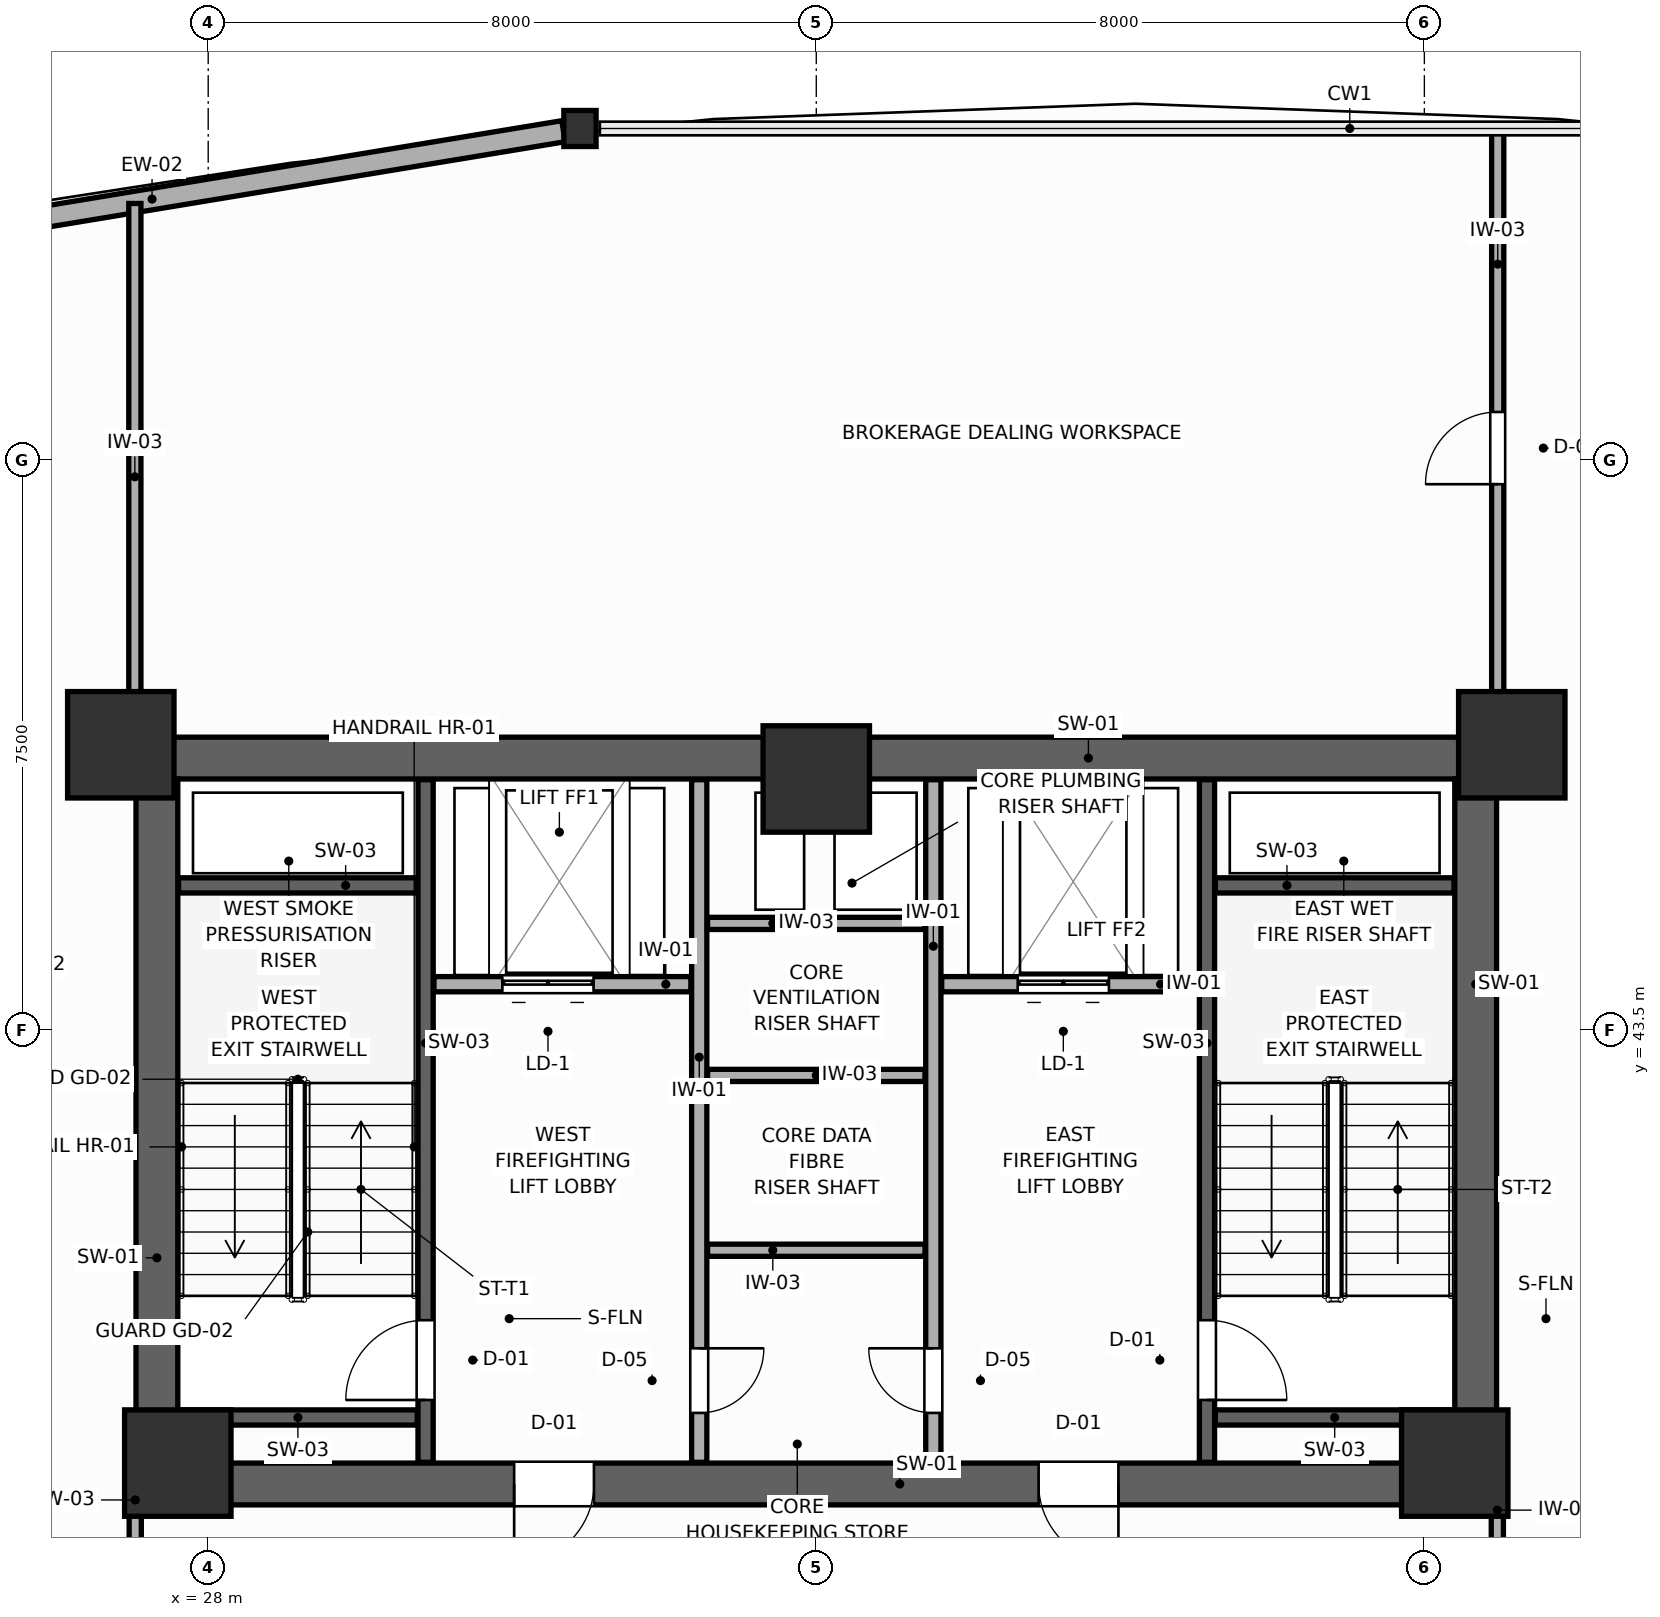
"""IFC4 building model, lengths in metres.
Left out: names, types, materials, properties, quantities, classifications, styles, units other than length and angle.
Written with IfcOpenShell. Run it as: python <this file> out.ifc"""

import sys

from ifc_helpers import new_model, si_unit, direction, frame, frame_2d, origin, origin_2d, place, context, subcontext, project, spatial, rectangle, i_section, extrude, source, transform, mapped, element, fill, save


model = new_model("IFC4")
c1 = context("Model", 3, precision=1e-05, world=origin(), true_north=direction((0.0, 1.0)))
c2 = subcontext(c1, "Body", "Model", "MODEL_VIEW")
j1 = project(units=[si_unit("LENGTHUNIT", "METRE"), si_unit("PLANEANGLEUNIT", "RADIAN")], contexts=[c1])
p1 = place(None, origin())
s1 = spatial("IfcSite", under=j1, at=p1, CompositionType="ELEMENT")
p2 = place(p1, origin())
s2 = spatial("IfcBuilding", under=s1, at=p2, CompositionType="ELEMENT")
p3 = place(p2, frame((0.0, 0.0, 87.3)))
s3 = spatial("IfcBuildingStorey", under=s2, at=p3, CompositionType="ELEMENT", Elevation=87.3)
p4 = place(p3, frame((27.05, 47.075, 0.0), z_axis=(0.0, 0.0, 1.0), x_axis=(1.0, 0.0, 0.0)))
e1 = element("IfcWall", 1, at=p4, inside=s3, PredefinedType="SHEAR", context=c2, shape_type="SweptSolid", body=[
    extrude(rectangle(XDim=17.9, YDim=0.55, at=frame_2d((8.95, 0.0))), origin(), (0.0, 0.0, 1.0), 3.9),
])
p5 = place(p3, frame((27.05, 37.525, 0.0), z_axis=(0.0, 0.0, 1.0), x_axis=(1.0, 0.0, 0.0)))
e2 = element("IfcWall", 2, at=p5, inside=s3, PredefinedType="SHEAR", context=c2, shape_type="SweptSolid", body=[
    extrude(rectangle(XDim=17.9, YDim=0.55, at=frame_2d((8.95, 0.0))), origin(), (0.0, 0.0, 1.0), 3.9),
])
p6 = place(p5, frame((4.975, 0.0, 0.0)))
e3 = element("IfcOpeningElement", 3, at=p6, cuts=e2, PredefinedType="OPENING", context=c2, shape_type="SweptSolid", body=[
    extrude(rectangle(XDim=1.05, YDim=2.1, at=frame_2d((0.525, 1.05))), frame((0.0, 0.285, 0.0), z_axis=(0.0, -1.0, 0.0), x_axis=(1.0, 0.0, 0.0)), (0.0, 0.0, 1.0), 0.57),
])
p7 = place(p5, frame((11.875, 0.0, 0.0)))
e4 = element("IfcOpeningElement", 4, at=p7, cuts=e2, PredefinedType="OPENING", context=c2, shape_type="SweptSolid", body=[
    extrude(rectangle(XDim=1.05, YDim=2.1, at=frame_2d((0.525, 1.05))), frame((0.0, 0.285, 0.0), z_axis=(0.0, -1.0, 0.0), x_axis=(1.0, 0.0, 0.0)), (0.0, 0.0, 1.0), 0.57),
])
for number, where, z_axis, x_axis in (
    (5, (27.325, 37.8, 0.0), (0.0, 0.0, 1.0), (0.0, 1.0, 0.0)),
    (6, (44.675, 37.8, 0.0), (0.0, 0.0, 1.0), (0.0, 1.0, 0.0)),
):
    element("IfcWall", number, at=place(p3, frame(where, z_axis=z_axis, x_axis=x_axis)), inside=s3, PredefinedType="SHEAR", context=c2, shape_type="SweptSolid", body=[
        extrude(rectangle(XDim=9.0, YDim=0.55, at=frame_2d((4.5, 0.0))), origin(), (0.0, 0.0, 1.0), 3.9),
    ])
m1 = source(origin(), c2, "Body", "SweptSolid", [
    extrude(rectangle(XDim=1.4, YDim=1.4, at=origin_2d()), origin(), (0.0, 0.0, 1.0), 3.9),
])
for number, where, z_axis, x_axis in (
    (7, (26.85, 47.25, 0.0), (0.0, 0.0, 1.0), (1.0, 0.0, 0.0)),
    (8, (45.15, 47.25, 0.0), (0.0, 0.0, 1.0), (1.0, 0.0, 0.0)),
    (9, (27.6, 37.8, 0.0), (0.0, 0.0, 1.0), (1.0, 0.0, 0.0)),
    (10, (44.4, 37.8, 0.0), (0.0, 0.0, 1.0), (1.0, 0.0, 0.0)),
    (11, (36.0, 46.8, 0.0), (0.0, 0.0, 1.0), (1.0, 0.0, 0.0)),
):
    element("IfcColumn", number, at=place(p3, frame(where, z_axis=z_axis, x_axis=x_axis)), inside=s3, PredefinedType="COLUMN", context=c2, shape_type="MappedRepresentation", body=[
        mapped(m1, transform((0.0, 0.0, 0.0), scale=1.0)),
    ])
m2 = source(origin(), c2, "Body", "SweptSolid", [
    extrude(i_section(OverallWidth=0.424, OverallDepth=0.474, WebThickness=0.045, FlangeThickness=0.072, FilletRadius=0.015, at=origin_2d()), origin(), (0.0, 0.0, 1.0), 3.9),
])
p8 = place(p3, frame((32.891, 55.358, 0.0), z_axis=(0.0, 0.0, 1.0), x_axis=(1.0, 0.0, 0.0)))
e12 = element("IfcColumn", 12, at=p8, inside=s3, PredefinedType="COLUMN", context=c2, shape_type="MappedRepresentation", body=[
    mapped(m2, transform((0.0, 0.0, 0.0), scale=1.0)),
])
p9 = place(p3, frame((32.674, 55.322, 0.0), z_axis=(0.0, 0.0, 1.0), x_axis=(-0.986649424809, -0.162858566012, 0.0)))
e13 = element("IfcWall", 13, at=p9, inside=s3, PredefinedType="SOLIDWALL", context=c2, shape_type="SweptSolid", body=[
    extrude(rectangle(XDim=16.836, YDim=0.28, at=frame_2d((8.418, 0.0))), origin(), (0.0, 0.0, 1.0), 3.23),
])
p10 = place(p9, frame((11.152, 0.0, 0.75)))
e14 = element("IfcOpeningElement", 14, at=p10, cuts=e13, PredefinedType="OPENING", context=c2, shape_type="SweptSolid", body=[
    extrude(rectangle(XDim=1.7, YDim=1.75, at=frame_2d((0.85, 0.875))), frame((0.0, 0.15, 0.0), z_axis=(0.0, -1.0, 0.0), x_axis=(1.0, 0.0, 0.0)), (0.0, 0.0, 1.0), 0.3),
])
p11 = place(p3, frame((30.86, 37.81, 0.0), z_axis=(0.0, 0.0, 1.0), x_axis=(0.0, 1.0, 0.0)))
e15 = element("IfcWall", 15, at=p11, inside=s3, PredefinedType="SHEAR", context=c2, shape_type="SweptSolid", body=[
    extrude(rectangle(XDim=8.98, YDim=0.2, at=frame_2d((4.49, 0.0))), origin(), (0.0, 0.0, 1.0), 3.9),
])
p12 = place(p11, frame((0.82, 0.0, 0.0)))
e16 = element("IfcOpeningElement", 16, at=p12, cuts=e15, PredefinedType="OPENING", context=c2, shape_type="SweptSolid", body=[
    extrude(rectangle(XDim=1.05, YDim=2.1, at=frame_2d((0.525, 1.05))), frame((0.0, 0.11, 0.0), z_axis=(0.0, -1.0, 0.0), x_axis=(1.0, 0.0, 0.0)), (0.0, 0.0, 1.0), 0.22),
])
for number, where, z_axis, x_axis in (
    (17, (27.61, 45.4, 0.0), (0.0, 0.0, 1.0), (1.0, 0.0, 0.0)),
    (18, (27.61, 38.4, 0.0), (0.0, 0.0, 1.0), (1.0, 0.0, 0.0)),
):
    element("IfcWall", number, at=place(p3, frame(where, z_axis=z_axis, x_axis=x_axis)), inside=s3, PredefinedType="SHEAR", context=c2, shape_type="SweptSolid", body=[
        extrude(rectangle(XDim=3.14, YDim=0.2, at=frame_2d((1.57, 0.0))), origin(), (0.0, 0.0, 1.0), 3.9),
    ])
p13 = place(p3, frame((41.14, 37.81, 0.0), z_axis=(0.0, 0.0, 1.0), x_axis=(0.0, 1.0, 0.0)))
e19 = element("IfcWall", 19, at=p13, inside=s3, PredefinedType="SHEAR", context=c2, shape_type="SweptSolid", body=[
    extrude(rectangle(XDim=8.98, YDim=0.2, at=frame_2d((4.49, 0.0))), origin(), (0.0, 0.0, 1.0), 3.9),
])
p14 = place(p13, frame((0.82, 0.0, 0.0)))
e20 = element("IfcOpeningElement", 20, at=p14, cuts=e19, PredefinedType="OPENING", context=c2, shape_type="SweptSolid", body=[
    extrude(rectangle(XDim=1.05, YDim=2.1, at=frame_2d((0.525, 1.05))), frame((0.0, 0.11, 0.0), z_axis=(0.0, -1.0, 0.0), x_axis=(1.0, 0.0, 0.0)), (0.0, 0.0, 1.0), 0.22),
])
for number, where, z_axis, x_axis in (
    (21, (41.25, 45.4, 0.0), (0.0, 0.0, 1.0), (1.0, 0.0, 0.0)),
    (22, (41.25, 38.4, 0.0), (0.0, 0.0, 1.0), (1.0, 0.0, 0.0)),
):
    element("IfcWall", number, at=place(p3, frame(where, z_axis=z_axis, x_axis=x_axis)), inside=s3, PredefinedType="SHEAR", context=c2, shape_type="SweptSolid", body=[
        extrude(rectangle(XDim=3.14, YDim=0.2, at=frame_2d((1.57, 0.0))), origin(), (0.0, 0.0, 1.0), 3.9),
    ])
p15 = place(p3, frame((30.97, 44.1, 0.0), z_axis=(0.0, 0.0, 1.0), x_axis=(1.0, 0.0, 0.0)))
e23 = element("IfcWall", 23, at=p15, inside=s3, PredefinedType="PARTITIONING", context=c2, shape_type="SweptSolid", body=[
    extrude(rectangle(XDim=3.38, YDim=0.2, at=frame_2d((1.69, 0.0))), origin(), (0.0, 0.0, 1.0), 3.68),
])
p16 = place(p15, frame((0.9, 0.0, 0.0)))
e24 = element("IfcOpeningElement", 24, at=p16, cuts=e23, PredefinedType="OPENING", context=c2, shape_type="SweptSolid", body=[
    extrude(rectangle(XDim=1.2, YDim=2.1, at=frame_2d((0.6, 1.05))), frame((0.0, 0.11, 0.0), z_axis=(0.0, -1.0, 0.0), x_axis=(1.0, 0.0, 0.0)), (0.0, 0.0, 1.0), 0.22),
])
p17 = place(p3, frame((37.65, 44.1, 0.0), z_axis=(0.0, 0.0, 1.0), x_axis=(1.0, 0.0, 0.0)))
e25 = element("IfcWall", 25, at=p17, inside=s3, PredefinedType="PARTITIONING", context=c2, shape_type="SweptSolid", body=[
    extrude(rectangle(XDim=3.38, YDim=0.2, at=frame_2d((1.69, 0.0))), origin(), (0.0, 0.0, 1.0), 3.68),
])
p18 = place(p17, frame((1.0, 0.0, 0.0)))
e26 = element("IfcOpeningElement", 26, at=p18, cuts=e25, PredefinedType="OPENING", context=c2, shape_type="SweptSolid", body=[
    extrude(rectangle(XDim=1.2, YDim=2.1, at=frame_2d((0.6, 1.05))), frame((0.0, 0.11, 0.0), z_axis=(0.0, -1.0, 0.0), x_axis=(1.0, 0.0, 0.0)), (0.0, 0.0, 1.0), 0.22),
])
p19 = place(p3, frame((34.46, 37.81, 0.0), z_axis=(0.0, 0.0, 1.0), x_axis=(0.0, 1.0, 0.0)))
e27 = element("IfcWall", 27, at=p19, inside=s3, PredefinedType="PARTITIONING", context=c2, shape_type="SweptSolid", body=[
    extrude(rectangle(XDim=8.98, YDim=0.2, at=frame_2d((4.49, 0.0))), origin(), (0.0, 0.0, 1.0), 3.68),
])
p20 = place(p19, frame((0.65, 0.0, 0.0)))
e28 = element("IfcOpeningElement", 28, at=p20, cuts=e27, PredefinedType="OPENING", context=c2, shape_type="SweptSolid", body=[
    extrude(rectangle(XDim=0.85, YDim=2.05, at=frame_2d((0.425, 1.025))), frame((0.0, 0.11, 0.0), z_axis=(0.0, -1.0, 0.0), x_axis=(1.0, 0.0, 0.0)), (0.0, 0.0, 1.0), 0.22),
])
p21 = place(p3, frame((37.54, 37.81, 0.0), z_axis=(0.0, 0.0, 1.0), x_axis=(0.0, 1.0, 0.0)))
e29 = element("IfcWall", 29, at=p21, inside=s3, PredefinedType="PARTITIONING", context=c2, shape_type="SweptSolid", body=[
    extrude(rectangle(XDim=8.98, YDim=0.2, at=frame_2d((4.49, 0.0))), origin(), (0.0, 0.0, 1.0), 3.68),
])
p22 = place(p21, frame((0.65, 0.0, 0.0)))
e30 = element("IfcOpeningElement", 30, at=p22, cuts=e29, PredefinedType="OPENING", context=c2, shape_type="SweptSolid", body=[
    extrude(rectangle(XDim=0.85, YDim=2.05, at=frame_2d((0.425, 1.025))), frame((0.0, 0.11, 0.0), z_axis=(0.0, -1.0, 0.0), x_axis=(1.0, 0.0, 0.0)), (0.0, 0.0, 1.0), 0.22),
])
for number, where, z_axis, x_axis in (
    (31, (34.57, 40.6, 0.0), (0.0, 0.0, 1.0), (1.0, 0.0, 0.0)),
    (32, (34.57, 42.9, 0.0), (0.0, 0.0, 1.0), (1.0, 0.0, 0.0)),
    (33, (34.57, 44.9, 0.0), (0.0, 0.0, 1.0), (1.0, 0.0, 0.0)),
):
    element("IfcWall", number, at=place(p3, frame(where, z_axis=z_axis, x_axis=x_axis)), inside=s3, PredefinedType="PARTITIONING", context=c2, shape_type="SweptSolid", body=[
        extrude(rectangle(XDim=2.86, YDim=0.16, at=frame_2d((1.43, 0.0))), origin(), (0.0, 0.0, 1.0), 3.68),
    ])
p23 = place(p3, frame((27.04, 35.0, 0.0), z_axis=(0.0, 0.0, 1.0), x_axis=(0.0, 1.0, 0.0)))
e34 = element("IfcWall", 34, at=p23, inside=s3, PredefinedType="PARTITIONING", context=c2, shape_type="SweptSolid", body=[
    extrude(rectangle(XDim=2.65, YDim=0.16, at=frame_2d((1.325, 0.0))), origin(), (0.0, 0.0, 1.0), 3.68),
])
p24 = place(p23, frame((0.75, 0.0, 0.0)))
e35 = element("IfcOpeningElement", 35, at=p24, cuts=e34, PredefinedType="OPENING", context=c2, shape_type="SweptSolid", body=[
    extrude(rectangle(XDim=1.05, YDim=2.1, at=frame_2d((0.525, 1.05))), frame((0.0, 0.09, 0.0), z_axis=(0.0, -1.0, 0.0), x_axis=(1.0, 0.0, 0.0)), (0.0, 0.0, 1.0), 0.18),
])
p25 = place(p3, frame((44.96, 35.0, 0.0), z_axis=(0.0, 0.0, 1.0), x_axis=(0.0, 1.0, 0.0)))
e36 = element("IfcWall", 36, at=p25, inside=s3, PredefinedType="PARTITIONING", context=c2, shape_type="SweptSolid", body=[
    extrude(rectangle(XDim=2.65, YDim=0.16, at=frame_2d((1.325, 0.0))), origin(), (0.0, 0.0, 1.0), 3.68),
])
p26 = place(p25, frame((0.75, 0.0, 0.0)))
e37 = element("IfcOpeningElement", 37, at=p26, cuts=e36, PredefinedType="OPENING", context=c2, shape_type="SweptSolid", body=[
    extrude(rectangle(XDim=1.05, YDim=2.1, at=frame_2d((0.525, 1.05))), frame((0.0, 0.09, 0.0), z_axis=(0.0, -1.0, 0.0), x_axis=(1.0, 0.0, 0.0)), (0.0, 0.0, 1.0), 0.18),
])
p27 = place(p3, frame((44.965, 47.18, 0.0), z_axis=(0.0, 0.0, 1.0), x_axis=(0.0, 1.0, 0.0)))
e38 = element("IfcWall", 38, at=p27, inside=s3, PredefinedType="PARTITIONING", context=c2, shape_type="SweptSolid", body=[
    extrude(rectangle(XDim=8.158, YDim=0.16, at=frame_2d((4.079, 0.0))), origin(), (0.0, 0.0, 1.0), 3.68),
])
p28 = place(p27, frame((3.498, 0.0, 0.0)))
e39 = element("IfcOpeningElement", 39, at=p28, cuts=e38, PredefinedType="OPENING", context=c2, shape_type="SweptSolid", body=[
    extrude(rectangle(XDim=0.95, YDim=2.05, at=frame_2d((0.475, 1.025))), frame((0.0, 0.09, 0.0), z_axis=(0.0, -1.0, 0.0), x_axis=(1.0, 0.0, 0.0)), (0.0, 0.0, 1.0), 0.18),
])
p29 = place(p3, frame((27.035, 47.18, 0.0), z_axis=(0.0, 0.0, 1.0), x_axis=(0.0, 1.0, 0.0)))
e40 = element("IfcWall", 40, at=p29, inside=s3, PredefinedType="PARTITIONING", context=c2, shape_type="SweptSolid", body=[
    extrude(rectangle(XDim=7.191, YDim=0.16, at=frame_2d((3.596, 0.0))), origin(), (0.0, 0.0, 1.0), 3.68),
])
p30 = place(p12, origin())
e41 = element("IfcDoor", 41, at=p30, inside=s3, OperationType="SINGLE_SWING_LEFT", PredefinedType="DOOR", context=c2, shape_type="SweptSolid", body=[
    extrude(rectangle(XDim=1.05, YDim=2.1, at=frame_2d((0.525, 1.05))), frame((0.0, 0.025, 0.0), z_axis=(0.0, -1.0, 0.0), x_axis=(1.0, 0.0, 0.0)), (0.0, 0.0, 1.0), 0.05),
])
fill(e16, e41)
p31 = place(p14, frame((1.05, 0.0, 0.0), z_axis=(0.0, 0.0, 1.0), x_axis=(-1.0, 0.0, 0.0)))
e42 = element("IfcDoor", 42, at=p31, inside=s3, OperationType="SINGLE_SWING_RIGHT", PredefinedType="DOOR", context=c2, shape_type="SweptSolid", body=[
    extrude(rectangle(XDim=1.05, YDim=2.1, at=frame_2d((0.525, 1.05))), frame((0.0, 0.025, 0.0), z_axis=(0.0, -1.0, 0.0), x_axis=(1.0, 0.0, 0.0)), (0.0, 0.0, 1.0), 0.05),
])
fill(e20, e42)
p32 = place(p16, origin())
e43 = element("IfcDoor", 43, at=p32, inside=s3, OperationType="DOUBLE_DOOR_SLIDING", PredefinedType="DOOR", context=c2, shape_type="SweptSolid", body=[
    extrude(rectangle(XDim=1.2, YDim=2.1, at=frame_2d((0.6, 1.05))), frame((0.0, 0.025, 0.0), z_axis=(0.0, -1.0, 0.0), x_axis=(1.0, 0.0, 0.0)), (0.0, 0.0, 1.0), 0.05),
])
fill(e24, e43)
p33 = place(p18, origin())
e44 = element("IfcDoor", 44, at=p33, inside=s3, OperationType="DOUBLE_DOOR_SLIDING", PredefinedType="DOOR", context=c2, shape_type="SweptSolid", body=[
    extrude(rectangle(XDim=1.2, YDim=2.1, at=frame_2d((0.6, 1.05))), frame((0.0, 0.025, 0.0), z_axis=(0.0, -1.0, 0.0), x_axis=(1.0, 0.0, 0.0)), (0.0, 0.0, 1.0), 0.05),
])
fill(e26, e44)
p34 = place(p20, frame((0.85, 0.0, 0.0), z_axis=(0.0, 0.0, 1.0), x_axis=(-1.0, 0.0, 0.0)))
e45 = element("IfcDoor", 45, at=p34, inside=s3, OperationType="SINGLE_SWING_LEFT", PredefinedType="DOOR", context=c2, shape_type="SweptSolid", body=[
    extrude(rectangle(XDim=0.85, YDim=2.05, at=frame_2d((0.425, 1.025))), frame((0.0, 0.025, 0.0), z_axis=(0.0, -1.0, 0.0), x_axis=(1.0, 0.0, 0.0)), (0.0, 0.0, 1.0), 0.05),
])
fill(e28, e45)
p35 = place(p22, origin())
e46 = element("IfcDoor", 46, at=p35, inside=s3, OperationType="SINGLE_SWING_RIGHT", PredefinedType="DOOR", context=c2, shape_type="SweptSolid", body=[
    extrude(rectangle(XDim=0.85, YDim=2.05, at=frame_2d((0.425, 1.025))), frame((0.0, 0.025, 0.0), z_axis=(0.0, -1.0, 0.0), x_axis=(1.0, 0.0, 0.0)), (0.0, 0.0, 1.0), 0.05),
])
fill(e30, e46)
p36 = place(p28, origin())
e47 = element("IfcDoor", 47, at=p36, inside=s3, OperationType="SINGLE_SWING_LEFT", PredefinedType="DOOR", context=c2, shape_type="SweptSolid", body=[
    extrude(rectangle(XDim=0.95, YDim=2.05, at=frame_2d((0.475, 1.025))), frame((0.0, 0.025, 0.0), z_axis=(0.0, -1.0, 0.0), x_axis=(1.0, 0.0, 0.0)), (0.0, 0.0, 1.0), 0.05),
])
fill(e39, e47)
p37 = place(p6, frame((1.05, 0.0, 0.0), z_axis=(0.0, 0.0, 1.0), x_axis=(-1.0, 0.0, 0.0)))
e48 = element("IfcDoor", 48, at=p37, inside=s3, OperationType="SINGLE_SWING_RIGHT", PredefinedType="DOOR", context=c2, shape_type="SweptSolid", body=[
    extrude(rectangle(XDim=1.05, YDim=2.1, at=frame_2d((0.525, 1.05))), frame((0.0, 0.025, 0.0), z_axis=(0.0, -1.0, 0.0), x_axis=(1.0, 0.0, 0.0)), (0.0, 0.0, 1.0), 0.05),
])
fill(e3, e48)
p38 = place(p7, frame((1.05, 0.0, 0.0), z_axis=(0.0, 0.0, 1.0), x_axis=(-1.0, 0.0, 0.0)))
e49 = element("IfcDoor", 49, at=p38, inside=s3, OperationType="SINGLE_SWING_LEFT", PredefinedType="DOOR", context=c2, shape_type="SweptSolid", body=[
    extrude(rectangle(XDim=1.05, YDim=2.1, at=frame_2d((0.525, 1.05))), frame((0.0, 0.025, 0.0), z_axis=(0.0, -1.0, 0.0), x_axis=(1.0, 0.0, 0.0)), (0.0, 0.0, 1.0), 0.05),
])
fill(e4, e49)
save(model, sys.argv[1])
